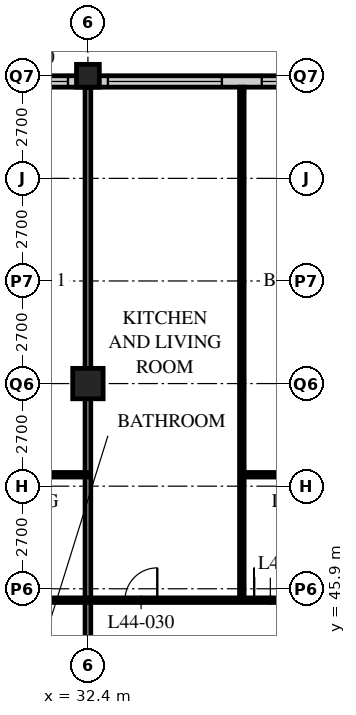
"""IFC4 building model, lengths in metres.
Left out: names, types, materials, properties, quantities, classifications, styles, units other than length and angle.
Written with IfcOpenShell. Run it as: python <this file> out.ifc"""

import sys

from ifc_helpers import new_model, si_unit, direction, frame, frame_2d, origin, origin_2d, place, context, subcontext, project, spatial, rectangle, hollow_rectangle, extrude, element, fill, save


model = new_model("IFC4")
c1 = context("Model", 3, precision=1e-05, world=origin(), true_north=direction((0.0, 1.0)))
c2 = subcontext(c1, "Body", "Model", "MODEL_VIEW")
j1 = project(units=[si_unit("LENGTHUNIT", "METRE"), si_unit("PLANEANGLEUNIT", "RADIAN")], contexts=[c1])
p1 = place(None, origin())
s1 = spatial("IfcSite", under=j1, at=p1, CompositionType="ELEMENT")
p2 = place(p1, origin())
s2 = spatial("IfcBuilding", under=s1, at=p2, CompositionType="ELEMENT")
p3 = place(p2, frame((0.0, 0.0, 174.0)))
s3 = spatial("IfcBuildingStorey", under=s2, at=p3, CompositionType="ELEMENT", Elevation=174.0)
p4 = place(p3, frame((32.4, 51.3, 0.0), z_axis=(0.0, 0.0, 1.0), x_axis=(1.0, 0.0, 0.0)))
e1 = element("IfcColumn", 1, at=p4, inside=s3, PredefinedType="COLUMN", context=c2, shape_type="SweptSolid", body=[
    extrude(hollow_rectangle(XDim=0.8, YDim=0.8, WallThickness=0.08, at=origin_2d()), origin(), (0.0, 0.0, 1.0), 3.6),
])
p5 = place(p3, frame((32.4, 59.4, 0.0), z_axis=(0.0, 0.0, 1.0), x_axis=(1.0, 0.0, 0.0)))
e2 = element("IfcColumn", 2, at=p5, inside=s3, PredefinedType="COLUMN", context=c2, shape_type="SweptSolid", body=[
    extrude(hollow_rectangle(XDim=0.6, YDim=0.6, WallThickness=0.05, at=origin_2d()), origin(), (0.0, 0.0, 1.0), 3.6),
])
p6 = place(p3, frame((48.3, 59.25, 0.0), z_axis=(0.0, 0.0, 1.0), x_axis=(-1.0, 0.0, 0.0)))
e3 = element("IfcWall", 3, at=p6, inside=s3, PredefinedType="SOLIDWALL", context=c2, shape_type="SweptSolid", body=[
    extrude(rectangle(XDim=40.2, YDim=0.3, at=frame_2d((20.1, 0.0))), origin(), (0.0, 0.0, 1.0), 3.39),
])
p7 = place(p6, frame((0.225, 0.0, 0.6)))
e4 = element("IfcOpeningElement", 4, at=p7, cuts=e3, PredefinedType="OPENING", context=c2, shape_type="SweptSolid", body=[
    extrude(rectangle(XDim=3.0, YDim=2.4, at=frame_2d((1.5, 1.2))), frame((0.0, 0.16, 0.0), z_axis=(0.0, -1.0, 0.0), x_axis=(1.0, 0.0, 0.0)), (0.0, 0.0, 1.0), 0.32),
])
p8 = place(p6, frame((4.275, 0.0, 0.6)))
e5 = element("IfcOpeningElement", 5, at=p8, cuts=e3, PredefinedType="OPENING", context=c2, shape_type="SweptSolid", body=[
    extrude(rectangle(XDim=3.0, YDim=2.4, at=frame_2d((1.5, 1.2))), frame((0.0, 0.16, 0.0), z_axis=(0.0, -1.0, 0.0), x_axis=(1.0, 0.0, 0.0)), (0.0, 0.0, 1.0), 0.32),
])
p9 = place(p6, frame((8.325, 0.0, 0.6)))
e6 = element("IfcOpeningElement", 6, at=p9, cuts=e3, PredefinedType="OPENING", context=c2, shape_type="SweptSolid", body=[
    extrude(rectangle(XDim=3.0, YDim=2.4, at=frame_2d((1.5, 1.2))), frame((0.0, 0.16, 0.0), z_axis=(0.0, -1.0, 0.0), x_axis=(1.0, 0.0, 0.0)), (0.0, 0.0, 1.0), 0.32),
])
p10 = place(p6, frame((12.375, 0.0, 0.6)))
e7 = element("IfcOpeningElement", 7, at=p10, cuts=e3, PredefinedType="OPENING", context=c2, shape_type="SweptSolid", body=[
    extrude(rectangle(XDim=3.0, YDim=2.4, at=frame_2d((1.5, 1.2))), frame((0.0, 0.16, 0.0), z_axis=(0.0, -1.0, 0.0), x_axis=(1.0, 0.0, 0.0)), (0.0, 0.0, 1.0), 0.32),
])
p11 = place(p6, frame((16.425, 0.0, 0.6)))
e8 = element("IfcOpeningElement", 8, at=p11, cuts=e3, PredefinedType="OPENING", context=c2, shape_type="SweptSolid", body=[
    extrude(rectangle(XDim=3.0, YDim=2.4, at=frame_2d((1.5, 1.2))), frame((0.0, 0.16, 0.0), z_axis=(0.0, -1.0, 0.0), x_axis=(1.0, 0.0, 0.0)), (0.0, 0.0, 1.0), 0.32),
])
p12 = place(p6, frame((20.475, 0.0, 0.6)))
e9 = element("IfcOpeningElement", 9, at=p12, cuts=e3, PredefinedType="OPENING", context=c2, shape_type="SweptSolid", body=[
    extrude(rectangle(XDim=3.0, YDim=2.4, at=frame_2d((1.5, 1.2))), frame((0.0, 0.16, 0.0), z_axis=(0.0, -1.0, 0.0), x_axis=(1.0, 0.0, 0.0)), (0.0, 0.0, 1.0), 0.32),
])
p13 = place(p6, frame((24.525, 0.0, 0.6)))
e10 = element("IfcOpeningElement", 10, at=p13, cuts=e3, PredefinedType="OPENING", context=c2, shape_type="SweptSolid", body=[
    extrude(rectangle(XDim=3.0, YDim=2.4, at=frame_2d((1.5, 1.2))), frame((0.0, 0.16, 0.0), z_axis=(0.0, -1.0, 0.0), x_axis=(1.0, 0.0, 0.0)), (0.0, 0.0, 1.0), 0.32),
])
p14 = place(p6, frame((28.575, 0.0, 0.6)))
e11 = element("IfcOpeningElement", 11, at=p14, cuts=e3, PredefinedType="OPENING", context=c2, shape_type="SweptSolid", body=[
    extrude(rectangle(XDim=3.0, YDim=2.4, at=frame_2d((1.5, 1.2))), frame((0.0, 0.16, 0.0), z_axis=(0.0, -1.0, 0.0), x_axis=(1.0, 0.0, 0.0)), (0.0, 0.0, 1.0), 0.32),
])
p15 = place(p6, frame((32.625, 0.0, 0.6)))
e12 = element("IfcOpeningElement", 12, at=p15, cuts=e3, PredefinedType="OPENING", context=c2, shape_type="SweptSolid", body=[
    extrude(rectangle(XDim=3.0, YDim=2.4, at=frame_2d((1.5, 1.2))), frame((0.0, 0.16, 0.0), z_axis=(0.0, -1.0, 0.0), x_axis=(1.0, 0.0, 0.0)), (0.0, 0.0, 1.0), 0.32),
])
p16 = place(p6, frame((36.675, 0.0, 0.6)))
e13 = element("IfcOpeningElement", 13, at=p16, cuts=e3, PredefinedType="OPENING", context=c2, shape_type="SweptSolid", body=[
    extrude(rectangle(XDim=3.0, YDim=2.4, at=frame_2d((1.5, 1.2))), frame((0.0, 0.16, 0.0), z_axis=(0.0, -1.0, 0.0), x_axis=(1.0, 0.0, 0.0)), (0.0, 0.0, 1.0), 0.32),
])
p17 = place(p3, frame((32.4, 43.2, 0.0), z_axis=(0.0, 0.0, 1.0), x_axis=(0.0, 1.0, 0.0)))
e14 = element("IfcWall", 14, at=p17, inside=s3, PredefinedType="PARTITIONING", context=c2, shape_type="SweptSolid", body=[
    extrude(rectangle(XDim=15.9, YDim=0.15, at=frame_2d((7.95, 0.0))), origin(), (0.0, 0.0, 1.0), 2.778),
])
p18 = place(p3, frame((36.45, 45.6, 0.0), z_axis=(0.0, 0.0, 1.0), x_axis=(0.0, 1.0, 0.0)))
e15 = element("IfcWall", 15, at=p18, inside=s3, PredefinedType="PARTITIONING", context=c2, shape_type="SweptSolid", body=[
    extrude(rectangle(XDim=13.5, YDim=0.12, at=frame_2d((6.75, 0.0))), origin(), (0.0, 0.0, 1.0), 3.39),
])
p19 = place(p3, frame((8.15, 45.6, 0.0), z_axis=(0.0, 0.0, 1.0), x_axis=(1.0, 0.0, 0.0)))
e16 = element("IfcWall", 16, at=p19, inside=s3, PredefinedType="PARTITIONING", context=c2, shape_type="SweptSolid", body=[
    extrude(rectangle(XDim=40.4, YDim=0.12, at=frame_2d((20.2, 0.0))), origin(), (0.0, 0.0, 1.0), 3.39),
])
p20 = place(p19, frame((9.025, 0.0, 0.0)))
e17 = element("IfcOpeningElement", 17, at=p20, cuts=e16, PredefinedType="OPENING", context=c2, shape_type="SweptSolid", body=[
    extrude(rectangle(XDim=0.85, YDim=2.1, at=frame_2d((0.425, 1.05))), frame((0.0, 0.07, 0.0), z_axis=(0.0, -1.0, 0.0), x_axis=(1.0, 0.0, 0.0)), (0.0, 0.0, 1.0), 0.14),
])
p21 = place(p19, frame((12.425, 0.0, 0.0)))
e18 = element("IfcOpeningElement", 18, at=p21, cuts=e16, PredefinedType="OPENING", context=c2, shape_type="SweptSolid", body=[
    extrude(rectangle(XDim=0.85, YDim=2.1, at=frame_2d((0.425, 1.05))), frame((0.0, 0.07, 0.0), z_axis=(0.0, -1.0, 0.0), x_axis=(1.0, 0.0, 0.0)), (0.0, 0.0, 1.0), 0.14),
])
p22 = place(p19, frame((17.125, 0.0, 0.0)))
e19 = element("IfcOpeningElement", 19, at=p22, cuts=e16, PredefinedType="OPENING", context=c2, shape_type="SweptSolid", body=[
    extrude(rectangle(XDim=0.85, YDim=2.1, at=frame_2d((0.425, 1.05))), frame((0.0, 0.07, 0.0), z_axis=(0.0, -1.0, 0.0), x_axis=(1.0, 0.0, 0.0)), (0.0, 0.0, 1.0), 0.14),
])
p23 = place(p19, frame((20.525, 0.0, 0.0)))
e20 = element("IfcOpeningElement", 20, at=p23, cuts=e16, PredefinedType="OPENING", context=c2, shape_type="SweptSolid", body=[
    extrude(rectangle(XDim=0.85, YDim=2.1, at=frame_2d((0.425, 1.05))), frame((0.0, 0.07, 0.0), z_axis=(0.0, -1.0, 0.0), x_axis=(1.0, 0.0, 0.0)), (0.0, 0.0, 1.0), 0.14),
])
p24 = place(p19, frame((25.225, 0.0, 0.0)))
e21 = element("IfcOpeningElement", 21, at=p24, cuts=e16, PredefinedType="OPENING", context=c2, shape_type="SweptSolid", body=[
    extrude(rectangle(XDim=0.85, YDim=2.1, at=frame_2d((0.425, 1.05))), frame((0.0, 0.07, 0.0), z_axis=(0.0, -1.0, 0.0), x_axis=(1.0, 0.0, 0.0)), (0.0, 0.0, 1.0), 0.14),
])
p25 = place(p19, frame((28.625, 0.0, 0.0)))
e22 = element("IfcOpeningElement", 22, at=p25, cuts=e16, PredefinedType="OPENING", context=c2, shape_type="SweptSolid", body=[
    extrude(rectangle(XDim=0.85, YDim=2.1, at=frame_2d((0.425, 1.05))), frame((0.0, 0.07, 0.0), z_axis=(0.0, -1.0, 0.0), x_axis=(1.0, 0.0, 0.0)), (0.0, 0.0, 1.0), 0.14),
])
p26 = place(p19, frame((32.825, 0.0, 0.0)))
e23 = element("IfcOpeningElement", 23, at=p26, cuts=e16, PredefinedType="OPENING", context=c2, shape_type="SweptSolid", body=[
    extrude(rectangle(XDim=0.85, YDim=2.1, at=frame_2d((0.425, 1.05))), frame((0.0, 0.07, 0.0), z_axis=(0.0, -1.0, 0.0), x_axis=(1.0, 0.0, 0.0)), (0.0, 0.0, 1.0), 0.14),
])
p27 = place(p19, frame((36.675, 0.0, 0.0)))
e24 = element("IfcOpeningElement", 24, at=p27, cuts=e16, PredefinedType="OPENING", context=c2, shape_type="SweptSolid", body=[
    extrude(rectangle(XDim=0.85, YDim=2.1, at=frame_2d((0.425, 1.05))), frame((0.0, 0.07, 0.0), z_axis=(0.0, -1.0, 0.0), x_axis=(1.0, 0.0, 0.0)), (0.0, 0.0, 1.0), 0.14),
])
p28 = place(p19, frame((6.725, 0.0, 0.0)))
e25 = element("IfcOpeningElement", 25, at=p28, cuts=e16, PredefinedType="OPENING", context=c2, shape_type="SweptSolid", body=[
    extrude(rectangle(XDim=0.85, YDim=2.1, at=frame_2d((0.425, 1.05))), frame((0.0, 0.07, 0.0), z_axis=(0.0, -1.0, 0.0), x_axis=(1.0, 0.0, 0.0)), (0.0, 0.0, 1.0), 0.14),
])
p29 = place(p19, frame((2.875, 0.0, 0.0)))
e26 = element("IfcOpeningElement", 26, at=p29, cuts=e16, PredefinedType="OPENING", context=c2, shape_type="SweptSolid", body=[
    extrude(rectangle(XDim=0.85, YDim=2.1, at=frame_2d((0.425, 1.05))), frame((0.0, 0.07, 0.0), z_axis=(0.0, -1.0, 0.0), x_axis=(1.0, 0.0, 0.0)), (0.0, 0.0, 1.0), 0.14),
])
p30 = place(p3, frame((28.35, 48.9, 0.0), z_axis=(0.0, 0.0, 1.0), x_axis=(1.0, 0.0, 0.0)))
e27 = element("IfcWall", 27, at=p30, inside=s3, PredefinedType="PARTITIONING", context=c2, shape_type="SweptSolid", body=[
    extrude(rectangle(XDim=4.05, YDim=0.12, at=frame_2d((2.025, 0.0))), origin(), (0.0, 0.0, 1.0), 3.39),
])
p31 = place(p30, frame((1.6, 0.0, 0.0)))
e28 = element("IfcOpeningElement", 28, at=p31, cuts=e27, PredefinedType="OPENING", context=c2, shape_type="SweptSolid", body=[
    extrude(rectangle(XDim=0.85, YDim=2.1, at=frame_2d((0.425, 1.05))), frame((0.0, 0.07, 0.0), z_axis=(0.0, -1.0, 0.0), x_axis=(1.0, 0.0, 0.0)), (0.0, 0.0, 1.0), 0.14),
])
p32 = place(p3, frame((36.45, 48.9, 0.0), z_axis=(0.0, 0.0, 1.0), x_axis=(1.0, 0.0, 0.0)))
e29 = element("IfcWall", 29, at=p32, inside=s3, PredefinedType="PARTITIONING", context=c2, shape_type="SweptSolid", body=[
    extrude(rectangle(XDim=8.1, YDim=0.12, at=frame_2d((4.05, 0.0))), origin(), (0.0, 0.0, 1.0), 3.39),
])
p33 = place(p32, frame((1.6, 0.0, 0.0)))
e30 = element("IfcOpeningElement", 30, at=p33, cuts=e29, PredefinedType="OPENING", context=c2, shape_type="SweptSolid", body=[
    extrude(rectangle(XDim=0.85, YDim=2.1, at=frame_2d((0.425, 1.05))), frame((0.0, 0.07, 0.0), z_axis=(0.0, -1.0, 0.0), x_axis=(1.0, 0.0, 0.0)), (0.0, 0.0, 1.0), 0.14),
])
p34 = place(p32, frame((5.65, 0.0, 0.0)))
e31 = element("IfcOpeningElement", 31, at=p34, cuts=e29, PredefinedType="OPENING", context=c2, shape_type="SweptSolid", body=[
    extrude(rectangle(XDim=0.85, YDim=2.1, at=frame_2d((0.425, 1.05))), frame((0.0, 0.07, 0.0), z_axis=(0.0, -1.0, 0.0), x_axis=(1.0, 0.0, 0.0)), (0.0, 0.0, 1.0), 0.14),
])
p35 = place(p9, origin())
e32 = element("IfcWindow", 32, at=p35, inside=s3, PartitioningType="SINGLE_PANEL", PredefinedType="WINDOW", context=c2, shape_type="SweptSolid", body=[
    extrude(rectangle(XDim=3.0, YDim=2.4, at=frame_2d((1.5, 1.2))), frame((0.0, 0.03, 0.0), z_axis=(0.0, -1.0, 0.0), x_axis=(1.0, 0.0, 0.0)), (0.0, 0.0, 1.0), 0.06),
])
fill(e6, e32)
p36 = place(p10, origin())
e33 = element("IfcWindow", 33, at=p36, inside=s3, PartitioningType="SINGLE_PANEL", PredefinedType="WINDOW", context=c2, shape_type="SweptSolid", body=[
    extrude(rectangle(XDim=3.0, YDim=2.4, at=frame_2d((1.5, 1.2))), frame((0.0, 0.03, 0.0), z_axis=(0.0, -1.0, 0.0), x_axis=(1.0, 0.0, 0.0)), (0.0, 0.0, 1.0), 0.06),
])
fill(e7, e33)
p37 = place(p11, origin())
e34 = element("IfcWindow", 34, at=p37, inside=s3, PartitioningType="SINGLE_PANEL", PredefinedType="WINDOW", context=c2, shape_type="SweptSolid", body=[
    extrude(rectangle(XDim=3.0, YDim=2.4, at=frame_2d((1.5, 1.2))), frame((0.0, 0.03, 0.0), z_axis=(0.0, -1.0, 0.0), x_axis=(1.0, 0.0, 0.0)), (0.0, 0.0, 1.0), 0.06),
])
fill(e8, e34)
p38 = place(p24, origin())
e35 = element("IfcDoor", 35, at=p38, inside=s3, OperationType="SINGLE_SWING_RIGHT", PredefinedType="DOOR", context=c2, shape_type="SweptSolid", body=[
    extrude(rectangle(XDim=0.85, YDim=2.1, at=frame_2d((0.425, 1.05))), frame((0.0, 0.025, 0.0), z_axis=(0.0, -1.0, 0.0), x_axis=(1.0, 0.0, 0.0)), (0.0, 0.0, 1.0), 0.05),
])
fill(e21, e35)
p39 = place(p25, origin())
e36 = element("IfcDoor", 36, at=p39, inside=s3, OperationType="SINGLE_SWING_LEFT", PredefinedType="DOOR", context=c2, shape_type="SweptSolid", body=[
    extrude(rectangle(XDim=0.85, YDim=2.1, at=frame_2d((0.425, 1.05))), frame((0.0, 0.025, 0.0), z_axis=(0.0, -1.0, 0.0), x_axis=(1.0, 0.0, 0.0)), (0.0, 0.0, 1.0), 0.05),
])
fill(e22, e36)
save(model, sys.argv[1])
